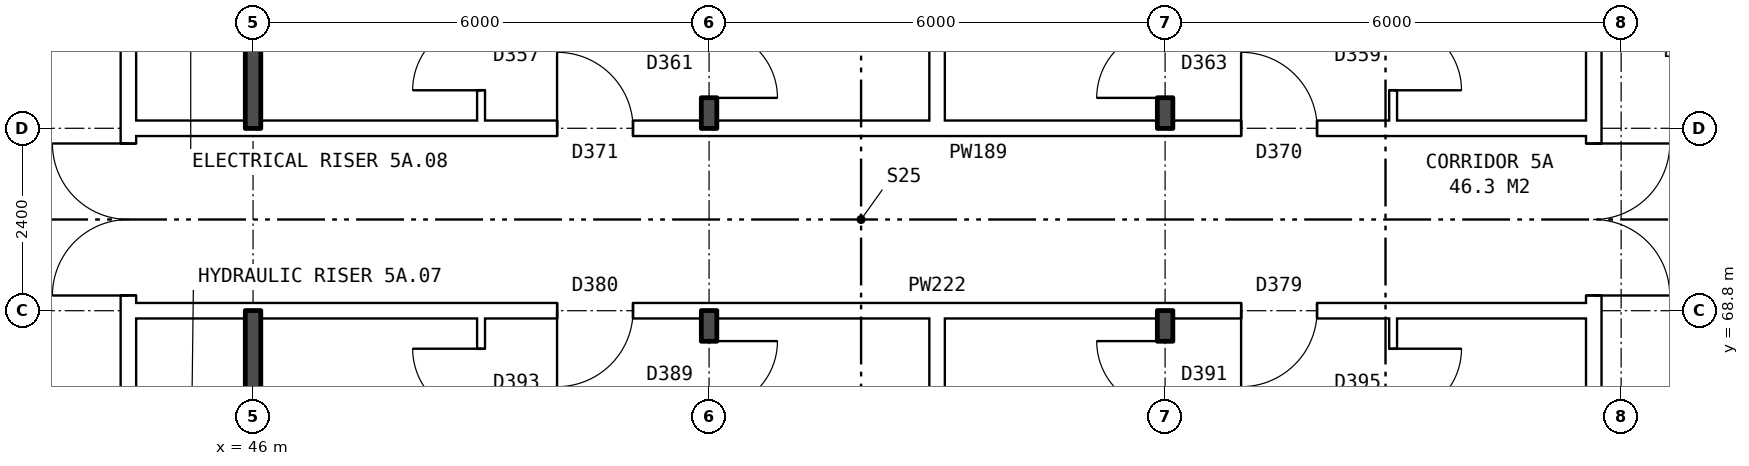
"""IFC4 building model, lengths in metres.
Left out: names, types, materials, properties, quantities, classifications, styles, units other than length and angle.
Written with IfcOpenShell. Run it as: python <this file> out.ifc"""

import sys

from ifc_helpers import new_model, si_unit, direction, frame, frame_2d, origin, place, context, subcontext, project, spatial, rectangle, extrude, element, fill, save


model = new_model("IFC4")
c1 = context("Model", 3, precision=1e-05, world=origin(), true_north=direction((0.0, 1.0)))
c2 = subcontext(c1, "Body", "Model", "MODEL_VIEW")
j1 = project(units=[si_unit("LENGTHUNIT", "METRE"), si_unit("PLANEANGLEUNIT", "RADIAN")], contexts=[c1])
p1 = place(None, origin())
s1 = spatial("IfcSite", under=j1, at=p1, CompositionType="ELEMENT")
p2 = place(p1, origin())
s2 = spatial("IfcBuilding", under=s1, at=p2, CompositionType="ELEMENT")
p3 = place(p2, frame((0.0, 0.0, 22.6)))
s3 = spatial("IfcBuildingStorey", under=s2, at=p3, CompositionType="ELEMENT", Elevation=22.6)
p4 = place(p3, frame((63.64, 63.9, 0.0), z_axis=(0.0, 0.0, 1.0), x_axis=(0.0, 1.0, 0.0)))
e1 = element("IfcWall", 1, at=p4, inside=s3, PredefinedType="PARTITIONING", context=c2, shape_type="SweptSolid", body=[
    extrude(rectangle(XDim=12.2, YDim=0.2, at=frame_2d((6.1, 0.0))), origin(), (0.0, 0.0, 1.0), 2.85),
])
p5 = place(p4, frame((5.1, 0.0, 0.0)))
e2 = element("IfcOpeningElement", 2, at=p5, cuts=e1, PredefinedType="OPENING", context=c2, shape_type="SweptSolid", body=[
    extrude(rectangle(XDim=2.0, YDim=2.1, at=frame_2d((1.0, 1.05))), frame((0.0, 0.11, 0.0), z_axis=(0.0, -1.0, 0.0), x_axis=(1.0, 0.0, 0.0)), (0.0, 0.0, 1.0), 0.22),
])
p6 = place(p3, frame((44.36, 63.9, 0.0), z_axis=(0.0, 0.0, 1.0), x_axis=(0.0, 1.0, 0.0)))
e3 = element("IfcWall", 3, at=p6, inside=s3, PredefinedType="PARTITIONING", context=c2, shape_type="SweptSolid", body=[
    extrude(rectangle(XDim=12.2, YDim=0.2, at=frame_2d((6.1, 0.0))), origin(), (0.0, 0.0, 1.0), 2.85),
])
p7 = place(p6, frame((5.1, 0.0, 0.0)))
e4 = element("IfcOpeningElement", 4, at=p7, cuts=e3, PredefinedType="OPENING", context=c2, shape_type="SweptSolid", body=[
    extrude(rectangle(XDim=2.0, YDim=2.1, at=frame_2d((1.0, 1.05))), frame((0.0, 0.11, 0.0), z_axis=(0.0, -1.0, 0.0), x_axis=(1.0, 0.0, 0.0)), (0.0, 0.0, 1.0), 0.22),
])
p8 = place(p3, frame((44.36, 68.8, 0.0), z_axis=(0.0, 0.0, 1.0), x_axis=(1.0, 0.0, 0.0)))
e5 = element("IfcWall", 5, at=p8, inside=s3, PredefinedType="PARTITIONING", context=c2, shape_type="SweptSolid", body=[
    extrude(rectangle(XDim=19.28, YDim=0.2, at=frame_2d((9.64, 0.0))), origin(), (0.0, 0.0, 1.0), 2.85),
])
p9 = place(p8, frame((14.64, 0.0, 0.0)))
e6 = element("IfcOpeningElement", 6, at=p9, cuts=e5, PredefinedType="OPENING", context=c2, shape_type="SweptSolid", body=[
    extrude(rectangle(XDim=1.0, YDim=2.1, at=frame_2d((0.5, 1.05))), frame((0.0, 0.11, 0.0), z_axis=(0.0, -1.0, 0.0), x_axis=(1.0, 0.0, 0.0)), (0.0, 0.0, 1.0), 0.22),
])
p10 = place(p8, frame((5.64, 0.0, 0.0)))
e7 = element("IfcOpeningElement", 7, at=p10, cuts=e5, PredefinedType="OPENING", context=c2, shape_type="SweptSolid", body=[
    extrude(rectangle(XDim=1.0, YDim=2.1, at=frame_2d((0.5, 1.05))), frame((0.0, 0.11, 0.0), z_axis=(0.0, -1.0, 0.0), x_axis=(1.0, 0.0, 0.0)), (0.0, 0.0, 1.0), 0.22),
])
p11 = place(p3, frame((44.36, 71.2, 0.0), z_axis=(0.0, 0.0, 1.0), x_axis=(1.0, 0.0, 0.0)))
e8 = element("IfcWall", 8, at=p11, inside=s3, PredefinedType="PARTITIONING", context=c2, shape_type="SweptSolid", body=[
    extrude(rectangle(XDim=19.28, YDim=0.2, at=frame_2d((9.64, 0.0))), origin(), (0.0, 0.0, 1.0), 2.85),
])
p12 = place(p11, frame((14.64, 0.0, 0.0)))
e9 = element("IfcOpeningElement", 9, at=p12, cuts=e8, PredefinedType="OPENING", context=c2, shape_type="SweptSolid", body=[
    extrude(rectangle(XDim=1.0, YDim=2.1, at=frame_2d((0.5, 1.05))), frame((0.0, 0.11, 0.0), z_axis=(0.0, -1.0, 0.0), x_axis=(1.0, 0.0, 0.0)), (0.0, 0.0, 1.0), 0.22),
])
p13 = place(p11, frame((5.64, 0.0, 0.0)))
e10 = element("IfcOpeningElement", 10, at=p13, cuts=e8, PredefinedType="OPENING", context=c2, shape_type="SweptSolid", body=[
    extrude(rectangle(XDim=1.0, YDim=2.1, at=frame_2d((0.5, 1.05))), frame((0.0, 0.11, 0.0), z_axis=(0.0, -1.0, 0.0), x_axis=(1.0, 0.0, 0.0)), (0.0, 0.0, 1.0), 0.22),
])
for number, where, z_axis, x_axis in (
    (11, (46.0, 63.8, 0.0), (0.0, 0.0, 1.0), (0.0, 1.0, 0.0)),
    (12, (46.0, 71.2, 0.0), (0.0, 0.0, 1.0), (0.0, 1.0, 0.0)),
):
    element("IfcWall", number, at=place(p3, frame(where, z_axis=z_axis, x_axis=x_axis)), inside=s3, PredefinedType="SOLIDWALL", context=c2, shape_type="SweptSolid", body=[
        extrude(rectangle(XDim=5.0, YDim=0.2, at=frame_2d((2.5, 0.0))), origin(), (0.0, 0.0, 1.0), 2.85),
    ])
p14 = place(p3, frame((49.0, 54.36, 0.0), z_axis=(0.0, 0.0, 1.0), x_axis=(0.0, 1.0, 0.0)))
e13 = element("IfcWall", 13, at=p14, inside=s3, PredefinedType="PARTITIONING", context=c2, shape_type="SweptSolid", body=[
    extrude(rectangle(XDim=14.34, YDim=0.1, at=frame_2d((7.17, 0.0))), origin(), (0.0, 0.0, 1.0), 2.85),
])
p15 = place(p14, frame((6.7, 0.0, 0.0)))
e14 = element("IfcOpeningElement", 14, at=p15, cuts=e13, PredefinedType="OPENING", context=c2, shape_type="SweptSolid", body=[
    extrude(rectangle(XDim=0.9, YDim=2.1, at=frame_2d((0.45, 1.05))), frame((0.0, 0.06, 0.0), z_axis=(0.0, -1.0, 0.0), x_axis=(1.0, 0.0, 0.0)), (0.0, 0.0, 1.0), 0.12),
])
p16 = place(p14, frame((13.04, 0.0, 0.0)))
e15 = element("IfcOpeningElement", 15, at=p16, cuts=e13, PredefinedType="OPENING", context=c2, shape_type="SweptSolid", body=[
    extrude(rectangle(XDim=0.9, YDim=2.1, at=frame_2d((0.45, 1.05))), frame((0.0, 0.06, 0.0), z_axis=(0.0, -1.0, 0.0), x_axis=(1.0, 0.0, 0.0)), (0.0, 0.0, 1.0), 0.12),
])
p17 = place(p3, frame((49.0, 71.3, 0.0), z_axis=(0.0, 0.0, 1.0), x_axis=(0.0, 1.0, 0.0)))
e16 = element("IfcWall", 16, at=p17, inside=s3, PredefinedType="PARTITIONING", context=c2, shape_type="SweptSolid", body=[
    extrude(rectangle(XDim=14.34, YDim=0.1, at=frame_2d((7.17, 0.0))), origin(), (0.0, 0.0, 1.0), 2.85),
])
p18 = place(p17, frame((9.24, 0.0, 0.0)))
e17 = element("IfcOpeningElement", 17, at=p18, cuts=e16, PredefinedType="OPENING", context=c2, shape_type="SweptSolid", body=[
    extrude(rectangle(XDim=0.9, YDim=2.1, at=frame_2d((0.45, 1.05))), frame((0.0, 0.06, 0.0), z_axis=(0.0, -1.0, 0.0), x_axis=(1.0, 0.0, 0.0)), (0.0, 0.0, 1.0), 0.12),
])
p19 = place(p17, frame((0.4, 0.0, 0.0)))
e18 = element("IfcOpeningElement", 18, at=p19, cuts=e16, PredefinedType="OPENING", context=c2, shape_type="SweptSolid", body=[
    extrude(rectangle(XDim=0.9, YDim=2.1, at=frame_2d((0.45, 1.05))), frame((0.0, 0.06, 0.0), z_axis=(0.0, -1.0, 0.0), x_axis=(1.0, 0.0, 0.0)), (0.0, 0.0, 1.0), 0.12),
])
p20 = place(p3, frame((52.0, 54.36, 0.0), z_axis=(0.0, 0.0, 1.0), x_axis=(0.0, 1.0, 0.0)))
e19 = element("IfcWall", 19, at=p20, inside=s3, PredefinedType="SOLIDWALL", context=c2, shape_type="SweptSolid", body=[
    extrude(rectangle(XDim=14.44, YDim=0.2, at=frame_2d((7.22, 0.0))), origin(), (0.0, 0.0, 1.0), 2.85),
])
p21 = place(p20, frame((6.7, 0.0, 0.0)))
e20 = element("IfcOpeningElement", 20, at=p21, cuts=e19, PredefinedType="OPENING", context=c2, shape_type="SweptSolid", body=[
    extrude(rectangle(XDim=0.9, YDim=2.1, at=frame_2d((0.45, 1.05))), frame((0.0, 0.11, 0.0), z_axis=(0.0, -1.0, 0.0), x_axis=(1.0, 0.0, 0.0)), (0.0, 0.0, 1.0), 0.22),
])
p22 = place(p20, frame((13.14, 0.0, 0.0)))
e21 = element("IfcOpeningElement", 21, at=p22, cuts=e19, PredefinedType="OPENING", context=c2, shape_type="SweptSolid", body=[
    extrude(rectangle(XDim=0.9, YDim=2.1, at=frame_2d((0.45, 1.05))), frame((0.0, 0.11, 0.0), z_axis=(0.0, -1.0, 0.0), x_axis=(1.0, 0.0, 0.0)), (0.0, 0.0, 1.0), 0.22),
])
p23 = place(p3, frame((52.0, 71.2, 0.0), z_axis=(0.0, 0.0, 1.0), x_axis=(0.0, 1.0, 0.0)))
e22 = element("IfcWall", 22, at=p23, inside=s3, PredefinedType="SOLIDWALL", context=c2, shape_type="SweptSolid", body=[
    extrude(rectangle(XDim=14.44, YDim=0.2, at=frame_2d((7.22, 0.0))), origin(), (0.0, 0.0, 1.0), 2.85),
])
p24 = place(p23, frame((9.34, 0.0, 0.0)))
e23 = element("IfcOpeningElement", 23, at=p24, cuts=e22, PredefinedType="OPENING", context=c2, shape_type="SweptSolid", body=[
    extrude(rectangle(XDim=0.9, YDim=2.1, at=frame_2d((0.45, 1.05))), frame((0.0, 0.11, 0.0), z_axis=(0.0, -1.0, 0.0), x_axis=(1.0, 0.0, 0.0)), (0.0, 0.0, 1.0), 0.22),
])
p25 = place(p23, frame((0.4, 0.0, 0.0)))
e24 = element("IfcOpeningElement", 24, at=p25, cuts=e22, PredefinedType="OPENING", context=c2, shape_type="SweptSolid", body=[
    extrude(rectangle(XDim=0.9, YDim=2.1, at=frame_2d((0.45, 1.05))), frame((0.0, 0.11, 0.0), z_axis=(0.0, -1.0, 0.0), x_axis=(1.0, 0.0, 0.0)), (0.0, 0.0, 1.0), 0.22),
])
for number, where, z_axis, x_axis in (
    (25, (55.0, 54.36, 0.0), (0.0, 0.0, 1.0), (0.0, 1.0, 0.0)),
    (26, (55.0, 71.3, 0.0), (0.0, 0.0, 1.0), (0.0, 1.0, 0.0)),
):
    element("IfcWall", number, at=place(p3, frame(where, z_axis=z_axis, x_axis=x_axis)), inside=s3, PredefinedType="PARTITIONING", context=c2, shape_type="SweptSolid", body=[
        extrude(rectangle(XDim=14.34, YDim=0.2, at=frame_2d((7.17, 0.0))), origin(), (0.0, 0.0, 1.0), 2.85),
    ])
p26 = place(p3, frame((58.0, 54.36, 0.0), z_axis=(0.0, 0.0, 1.0), x_axis=(0.0, 1.0, 0.0)))
e27 = element("IfcWall", 27, at=p26, inside=s3, PredefinedType="SOLIDWALL", context=c2, shape_type="SweptSolid", body=[
    extrude(rectangle(XDim=14.44, YDim=0.2, at=frame_2d((7.22, 0.0))), origin(), (0.0, 0.0, 1.0), 2.85),
])
p27 = place(p26, frame((7.7, 0.0, 0.0)))
e28 = element("IfcOpeningElement", 28, at=p27, cuts=e27, PredefinedType="OPENING", context=c2, shape_type="SweptSolid", body=[
    extrude(rectangle(XDim=0.9, YDim=2.1, at=frame_2d((0.45, 1.05))), frame((0.0, 0.11, 0.0), z_axis=(0.0, -1.0, 0.0), x_axis=(1.0, 0.0, 0.0)), (0.0, 0.0, 1.0), 0.22),
])
p28 = place(p26, frame((13.14, 0.0, 0.0)))
e29 = element("IfcOpeningElement", 29, at=p28, cuts=e27, PredefinedType="OPENING", context=c2, shape_type="SweptSolid", body=[
    extrude(rectangle(XDim=0.9, YDim=2.1, at=frame_2d((0.45, 1.05))), frame((0.0, 0.11, 0.0), z_axis=(0.0, -1.0, 0.0), x_axis=(1.0, 0.0, 0.0)), (0.0, 0.0, 1.0), 0.22),
])
p29 = place(p3, frame((58.0, 71.2, 0.0), z_axis=(0.0, 0.0, 1.0), x_axis=(0.0, 1.0, 0.0)))
e30 = element("IfcWall", 30, at=p29, inside=s3, PredefinedType="SOLIDWALL", context=c2, shape_type="SweptSolid", body=[
    extrude(rectangle(XDim=14.44, YDim=0.2, at=frame_2d((7.22, 0.0))), origin(), (0.0, 0.0, 1.0), 2.85),
])
p30 = place(p29, frame((9.34, 0.0, 0.0)))
e31 = element("IfcOpeningElement", 31, at=p30, cuts=e30, PredefinedType="OPENING", context=c2, shape_type="SweptSolid", body=[
    extrude(rectangle(XDim=0.9, YDim=2.1, at=frame_2d((0.45, 1.05))), frame((0.0, 0.11, 0.0), z_axis=(0.0, -1.0, 0.0), x_axis=(1.0, 0.0, 0.0)), (0.0, 0.0, 1.0), 0.22),
])
p31 = place(p29, frame((0.4, 0.0, 0.0)))
e32 = element("IfcOpeningElement", 32, at=p31, cuts=e30, PredefinedType="OPENING", context=c2, shape_type="SweptSolid", body=[
    extrude(rectangle(XDim=0.9, YDim=2.1, at=frame_2d((0.45, 1.05))), frame((0.0, 0.11, 0.0), z_axis=(0.0, -1.0, 0.0), x_axis=(1.0, 0.0, 0.0)), (0.0, 0.0, 1.0), 0.22),
])
p32 = place(p3, frame((61.0, 54.36, 0.0), z_axis=(0.0, 0.0, 1.0), x_axis=(0.0, 1.0, 0.0)))
e33 = element("IfcWall", 33, at=p32, inside=s3, PredefinedType="PARTITIONING", context=c2, shape_type="SweptSolid", body=[
    extrude(rectangle(XDim=14.34, YDim=0.1, at=frame_2d((7.17, 0.0))), origin(), (0.0, 0.0, 1.0), 2.85),
])
p33 = place(p32, frame((7.7, 0.0, 0.0)))
e34 = element("IfcOpeningElement", 34, at=p33, cuts=e33, PredefinedType="OPENING", context=c2, shape_type="SweptSolid", body=[
    extrude(rectangle(XDim=0.9, YDim=2.1, at=frame_2d((0.45, 1.05))), frame((0.0, 0.06, 0.0), z_axis=(0.0, -1.0, 0.0), x_axis=(1.0, 0.0, 0.0)), (0.0, 0.0, 1.0), 0.12),
])
p34 = place(p32, frame((13.04, 0.0, 0.0)))
e35 = element("IfcOpeningElement", 35, at=p34, cuts=e33, PredefinedType="OPENING", context=c2, shape_type="SweptSolid", body=[
    extrude(rectangle(XDim=0.9, YDim=2.1, at=frame_2d((0.45, 1.05))), frame((0.0, 0.06, 0.0), z_axis=(0.0, -1.0, 0.0), x_axis=(1.0, 0.0, 0.0)), (0.0, 0.0, 1.0), 0.12),
])
p35 = place(p3, frame((61.0, 71.3, 0.0), z_axis=(0.0, 0.0, 1.0), x_axis=(0.0, 1.0, 0.0)))
e36 = element("IfcWall", 36, at=p35, inside=s3, PredefinedType="PARTITIONING", context=c2, shape_type="SweptSolid", body=[
    extrude(rectangle(XDim=14.34, YDim=0.1, at=frame_2d((7.17, 0.0))), origin(), (0.0, 0.0, 1.0), 2.85),
])
p36 = place(p35, frame((9.24, 0.0, 0.0)))
e37 = element("IfcOpeningElement", 37, at=p36, cuts=e36, PredefinedType="OPENING", context=c2, shape_type="SweptSolid", body=[
    extrude(rectangle(XDim=0.9, YDim=2.1, at=frame_2d((0.45, 1.05))), frame((0.0, 0.06, 0.0), z_axis=(0.0, -1.0, 0.0), x_axis=(1.0, 0.0, 0.0)), (0.0, 0.0, 1.0), 0.12),
])
p37 = place(p35, frame((0.4, 0.0, 0.0)))
e38 = element("IfcOpeningElement", 38, at=p37, cuts=e36, PredefinedType="OPENING", context=c2, shape_type="SweptSolid", body=[
    extrude(rectangle(XDim=0.9, YDim=2.1, at=frame_2d((0.45, 1.05))), frame((0.0, 0.06, 0.0), z_axis=(0.0, -1.0, 0.0), x_axis=(1.0, 0.0, 0.0)), (0.0, 0.0, 1.0), 0.12),
])
p38 = place(p5, frame((2.0, 0.0, 0.0), z_axis=(0.0, 0.0, 1.0), x_axis=(-1.0, 0.0, 0.0)))
e39 = element("IfcDoor", 39, at=p38, inside=s3, OperationType="DOUBLE_DOOR_SINGLE_SWING", PredefinedType="DOOR", context=c2, shape_type="SweptSolid", body=[
    extrude(rectangle(XDim=2.0, YDim=2.1, at=frame_2d((1.0, 1.05))), frame((0.0, 0.025, 0.0), z_axis=(0.0, -1.0, 0.0), x_axis=(1.0, 0.0, 0.0)), (0.0, 0.0, 1.0), 0.05),
])
fill(e2, e39)
p39 = place(p7, origin())
e40 = element("IfcDoor", 40, at=p39, inside=s3, OperationType="DOUBLE_DOOR_SINGLE_SWING", PredefinedType="DOOR", context=c2, shape_type="SweptSolid", body=[
    extrude(rectangle(XDim=2.0, YDim=2.1, at=frame_2d((1.0, 1.05))), frame((0.0, 0.025, 0.0), z_axis=(0.0, -1.0, 0.0), x_axis=(1.0, 0.0, 0.0)), (0.0, 0.0, 1.0), 0.05),
])
fill(e4, e40)
p40 = place(p9, frame((1.0, 0.0, 0.0), z_axis=(0.0, 0.0, 1.0), x_axis=(-1.0, 0.0, 0.0)))
e41 = element("IfcDoor", 41, at=p40, inside=s3, OperationType="SINGLE_SWING_RIGHT", PredefinedType="DOOR", context=c2, shape_type="SweptSolid", body=[
    extrude(rectangle(XDim=1.0, YDim=2.1, at=frame_2d((0.5, 1.05))), frame((0.0, 0.025, 0.0), z_axis=(0.0, -1.0, 0.0), x_axis=(1.0, 0.0, 0.0)), (0.0, 0.0, 1.0), 0.05),
])
fill(e6, e41)
p41 = place(p34, frame((0.9, 0.0, 0.0), z_axis=(0.0, 0.0, 1.0), x_axis=(-1.0, 0.0, 0.0)))
e42 = element("IfcDoor", 42, at=p41, inside=s3, OperationType="SINGLE_SWING_LEFT", PredefinedType="DOOR", context=c2, shape_type="SweptSolid", body=[
    extrude(rectangle(XDim=0.9, YDim=2.1, at=frame_2d((0.45, 1.05))), frame((0.0, 0.025, 0.0), z_axis=(0.0, -1.0, 0.0), x_axis=(1.0, 0.0, 0.0)), (0.0, 0.0, 1.0), 0.05),
])
fill(e35, e42)
p42 = place(p28, origin())
e43 = element("IfcDoor", 43, at=p42, inside=s3, OperationType="SINGLE_SWING_RIGHT", PredefinedType="DOOR", context=c2, shape_type="SweptSolid", body=[
    extrude(rectangle(XDim=0.9, YDim=2.1, at=frame_2d((0.45, 1.05))), frame((0.0, 0.025, 0.0), z_axis=(0.0, -1.0, 0.0), x_axis=(1.0, 0.0, 0.0)), (0.0, 0.0, 1.0), 0.05),
])
fill(e29, e43)
p43 = place(p10, frame((1.0, 0.0, 0.0), z_axis=(0.0, 0.0, 1.0), x_axis=(-1.0, 0.0, 0.0)))
e44 = element("IfcDoor", 44, at=p43, inside=s3, OperationType="SINGLE_SWING_RIGHT", PredefinedType="DOOR", context=c2, shape_type="SweptSolid", body=[
    extrude(rectangle(XDim=1.0, YDim=2.1, at=frame_2d((0.5, 1.05))), frame((0.0, 0.025, 0.0), z_axis=(0.0, -1.0, 0.0), x_axis=(1.0, 0.0, 0.0)), (0.0, 0.0, 1.0), 0.05),
])
fill(e7, e44)
p44 = place(p22, frame((0.9, 0.0, 0.0), z_axis=(0.0, 0.0, 1.0), x_axis=(-1.0, 0.0, 0.0)))
e45 = element("IfcDoor", 45, at=p44, inside=s3, OperationType="SINGLE_SWING_LEFT", PredefinedType="DOOR", context=c2, shape_type="SweptSolid", body=[
    extrude(rectangle(XDim=0.9, YDim=2.1, at=frame_2d((0.45, 1.05))), frame((0.0, 0.025, 0.0), z_axis=(0.0, -1.0, 0.0), x_axis=(1.0, 0.0, 0.0)), (0.0, 0.0, 1.0), 0.05),
])
fill(e21, e45)
p45 = place(p16, origin())
e46 = element("IfcDoor", 46, at=p45, inside=s3, OperationType="SINGLE_SWING_RIGHT", PredefinedType="DOOR", context=c2, shape_type="SweptSolid", body=[
    extrude(rectangle(XDim=0.9, YDim=2.1, at=frame_2d((0.45, 1.05))), frame((0.0, 0.025, 0.0), z_axis=(0.0, -1.0, 0.0), x_axis=(1.0, 0.0, 0.0)), (0.0, 0.0, 1.0), 0.05),
])
fill(e15, e46)
p46 = place(p12, origin())
e47 = element("IfcDoor", 47, at=p46, inside=s3, OperationType="SINGLE_SWING_LEFT", PredefinedType="DOOR", context=c2, shape_type="SweptSolid", body=[
    extrude(rectangle(XDim=1.0, YDim=2.1, at=frame_2d((0.5, 1.05))), frame((0.0, 0.025, 0.0), z_axis=(0.0, -1.0, 0.0), x_axis=(1.0, 0.0, 0.0)), (0.0, 0.0, 1.0), 0.05),
])
fill(e9, e47)
p47 = place(p37, frame((0.9, 0.0, 0.0), z_axis=(0.0, 0.0, 1.0), x_axis=(-1.0, 0.0, 0.0)))
e48 = element("IfcDoor", 48, at=p47, inside=s3, OperationType="SINGLE_SWING_RIGHT", PredefinedType="DOOR", context=c2, shape_type="SweptSolid", body=[
    extrude(rectangle(XDim=0.9, YDim=2.1, at=frame_2d((0.45, 1.05))), frame((0.0, 0.025, 0.0), z_axis=(0.0, -1.0, 0.0), x_axis=(1.0, 0.0, 0.0)), (0.0, 0.0, 1.0), 0.05),
])
fill(e38, e48)
p48 = place(p31, origin())
e49 = element("IfcDoor", 49, at=p48, inside=s3, OperationType="SINGLE_SWING_LEFT", PredefinedType="DOOR", context=c2, shape_type="SweptSolid", body=[
    extrude(rectangle(XDim=0.9, YDim=2.1, at=frame_2d((0.45, 1.05))), frame((0.0, 0.025, 0.0), z_axis=(0.0, -1.0, 0.0), x_axis=(1.0, 0.0, 0.0)), (0.0, 0.0, 1.0), 0.05),
])
fill(e32, e49)
p49 = place(p13, origin())
e50 = element("IfcDoor", 50, at=p49, inside=s3, OperationType="SINGLE_SWING_LEFT", PredefinedType="DOOR", context=c2, shape_type="SweptSolid", body=[
    extrude(rectangle(XDim=1.0, YDim=2.1, at=frame_2d((0.5, 1.05))), frame((0.0, 0.025, 0.0), z_axis=(0.0, -1.0, 0.0), x_axis=(1.0, 0.0, 0.0)), (0.0, 0.0, 1.0), 0.05),
])
fill(e10, e50)
p50 = place(p25, frame((0.9, 0.0, 0.0), z_axis=(0.0, 0.0, 1.0), x_axis=(-1.0, 0.0, 0.0)))
e51 = element("IfcDoor", 51, at=p50, inside=s3, OperationType="SINGLE_SWING_RIGHT", PredefinedType="DOOR", context=c2, shape_type="SweptSolid", body=[
    extrude(rectangle(XDim=0.9, YDim=2.1, at=frame_2d((0.45, 1.05))), frame((0.0, 0.025, 0.0), z_axis=(0.0, -1.0, 0.0), x_axis=(1.0, 0.0, 0.0)), (0.0, 0.0, 1.0), 0.05),
])
fill(e24, e51)
p51 = place(p19, origin())
e52 = element("IfcDoor", 52, at=p51, inside=s3, OperationType="SINGLE_SWING_LEFT", PredefinedType="DOOR", context=c2, shape_type="SweptSolid", body=[
    extrude(rectangle(XDim=0.9, YDim=2.1, at=frame_2d((0.45, 1.05))), frame((0.0, 0.025, 0.0), z_axis=(0.0, -1.0, 0.0), x_axis=(1.0, 0.0, 0.0)), (0.0, 0.0, 1.0), 0.05),
])
fill(e18, e52)
save(model, sys.argv[1])
